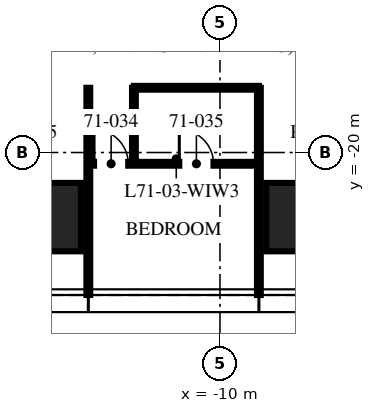
"""IFC4 building model, lengths in metres.
Left out: names, types, materials, properties, quantities, classifications, styles, units other than length and angle.
Written with IfcOpenShell. Run it as: python <this file> out.ifc"""

import sys

from ifc_helpers import new_model, si_unit, direction, frame, frame_2d, origin, origin_2d, place, context, subcontext, project, spatial, rectangle, extrude, element, fill, save


model = new_model("IFC4")
c1 = context("Model", 3, precision=1e-05, world=origin(), true_north=direction((0.0, 1.0)))
c2 = subcontext(c1, "Body", "Model", "MODEL_VIEW")
j1 = project(units=[si_unit("LENGTHUNIT", "METRE"), si_unit("PLANEANGLEUNIT", "RADIAN")], contexts=[c1])
p1 = place(None, origin())
s1 = spatial("IfcSite", under=j1, at=p1, CompositionType="ELEMENT")
p2 = place(p1, origin())
s2 = spatial("IfcBuilding", under=s1, at=p2, CompositionType="ELEMENT")
p3 = place(p2, frame((0.0, 0.0, 285.75)))
s3 = spatial("IfcBuildingStorey", under=s2, at=p3, CompositionType="ELEMENT", Elevation=285.75)
p4 = place(p3, frame((-7.48, -21.7, -0.09), z_axis=(0.0, 0.0, 1.0), x_axis=(1.0, 0.0, 0.0)))
e1 = element("IfcColumn", 1, at=p4, inside=s3, PredefinedType="COLUMN", context=c2, shape_type="SweptSolid", body=[
    extrude(rectangle(XDim=2.6, YDim=1.8, at=origin_2d()), origin(), (0.0, 0.0, 1.0), 3.84),
])
p5 = place(p3, frame((-14.96, -21.7, 0.04), z_axis=(0.0, 0.0, 1.0), x_axis=(1.0, 0.0, 0.0)))
e2 = element("IfcColumn", 2, at=p5, inside=s3, PredefinedType="COLUMN", context=c2, shape_type="SweptSolid", body=[
    extrude(rectangle(XDim=2.6, YDim=1.8, at=origin_2d()), origin(), (0.0, 0.0, 1.0), 3.71),
])
for number, where, z_axis, x_axis in (
    (3, (-13.464, -18.296, 0.0), (0.0, 0.0, 1.0), (0.0, -1.0, 0.0)),
    (4, (-8.976, -18.296, 0.0), (0.0, 0.0, 1.0), (0.0, -1.0, 0.0)),
):
    element("IfcWall", number, at=place(p3, frame(where, z_axis=z_axis, x_axis=x_axis)), inside=s3, PredefinedType="PARTITIONING", context=c2, shape_type="SweptSolid", body=[
        extrude(rectangle(XDim=5.454, YDim=0.1, at=frame_2d((2.727, 0.0))), origin(), (0.0, 0.0, 1.0), 3.01),
    ])
p6 = place(p3, frame((-13.464, -20.296, 0.0), z_axis=(0.0, 0.0, 1.0), x_axis=(1.0, 0.0, 0.0)))
e5 = element("IfcWall", 5, at=p6, inside=s3, PredefinedType="PARTITIONING", context=c2, shape_type="SweptSolid", body=[
    extrude(rectangle(XDim=4.488, YDim=0.1, at=frame_2d((2.244, 0.0))), origin(), (0.0, 0.0, 1.0), 2.91),
])
p7 = place(p6, frame((0.15, 0.0, 0.0)))
e6 = element("IfcOpeningElement", 6, at=p7, cuts=e5, PredefinedType="OPENING", context=c2, shape_type="SweptSolid", body=[
    extrude(rectangle(XDim=0.9, YDim=2.1, at=frame_2d((0.45, 1.05))), frame((0.0, 0.06, 0.0), z_axis=(0.0, -1.0, 0.0), x_axis=(1.0, 0.0, 0.0)), (0.0, 0.0, 1.0), 0.12),
])
p8 = place(p6, frame((2.394, 0.0, 0.0)))
e7 = element("IfcOpeningElement", 7, at=p8, cuts=e5, PredefinedType="OPENING", context=c2, shape_type="SweptSolid", body=[
    extrude(rectangle(XDim=0.9, YDim=2.1, at=frame_2d((0.45, 1.05))), frame((0.0, 0.06, 0.0), z_axis=(0.0, -1.0, 0.0), x_axis=(1.0, 0.0, 0.0)), (0.0, 0.0, 1.0), 0.12),
])
p9 = place(p3, frame((-12.264, -18.296, 0.0), z_axis=(0.0, 0.0, 1.0), x_axis=(0.0, -1.0, 0.0)))
e8 = element("IfcWall", 8, at=p9, inside=s3, PredefinedType="PARTITIONING", context=c2, shape_type="SweptSolid", body=[
    extrude(rectangle(XDim=2.0, YDim=0.1, at=frame_2d((1.0, 0.0))), origin(), (0.0, 0.0, 1.0), 3.5),
])
p10 = place(p3, frame((-12.264, -18.296, 0.0), z_axis=(0.0, 0.0, 1.0), x_axis=(1.0, 0.0, 0.0)))
e9 = element("IfcWall", 9, at=p10, inside=s3, PredefinedType="PARTITIONING", context=c2, shape_type="SweptSolid", body=[
    extrude(rectangle(XDim=3.288, YDim=0.1, at=frame_2d((1.644, 0.0))), origin(), (0.0, 0.0, 1.0), 2.91),
])
p11 = place(p7, origin())
e10 = element("IfcDoor", 10, at=p11, inside=s3, OperationType="SINGLE_SWING_LEFT", PredefinedType="DOOR", context=c2, shape_type="SweptSolid", body=[
    extrude(rectangle(XDim=0.9, YDim=2.1, at=frame_2d((0.45, 1.05))), frame((0.0, 0.025, 0.0), z_axis=(0.0, -1.0, 0.0), x_axis=(1.0, 0.0, 0.0)), (0.0, 0.0, 1.0), 0.05),
])
fill(e6, e10)
p12 = place(p8, origin())
e11 = element("IfcDoor", 11, at=p12, inside=s3, OperationType="SINGLE_SWING_LEFT", PredefinedType="DOOR", context=c2, shape_type="SweptSolid", body=[
    extrude(rectangle(XDim=0.9, YDim=2.1, at=frame_2d((0.45, 1.05))), frame((0.0, 0.025, 0.0), z_axis=(0.0, -1.0, 0.0), x_axis=(1.0, 0.0, 0.0)), (0.0, 0.0, 1.0), 0.05),
])
fill(e7, e11)
save(model, sys.argv[1])
